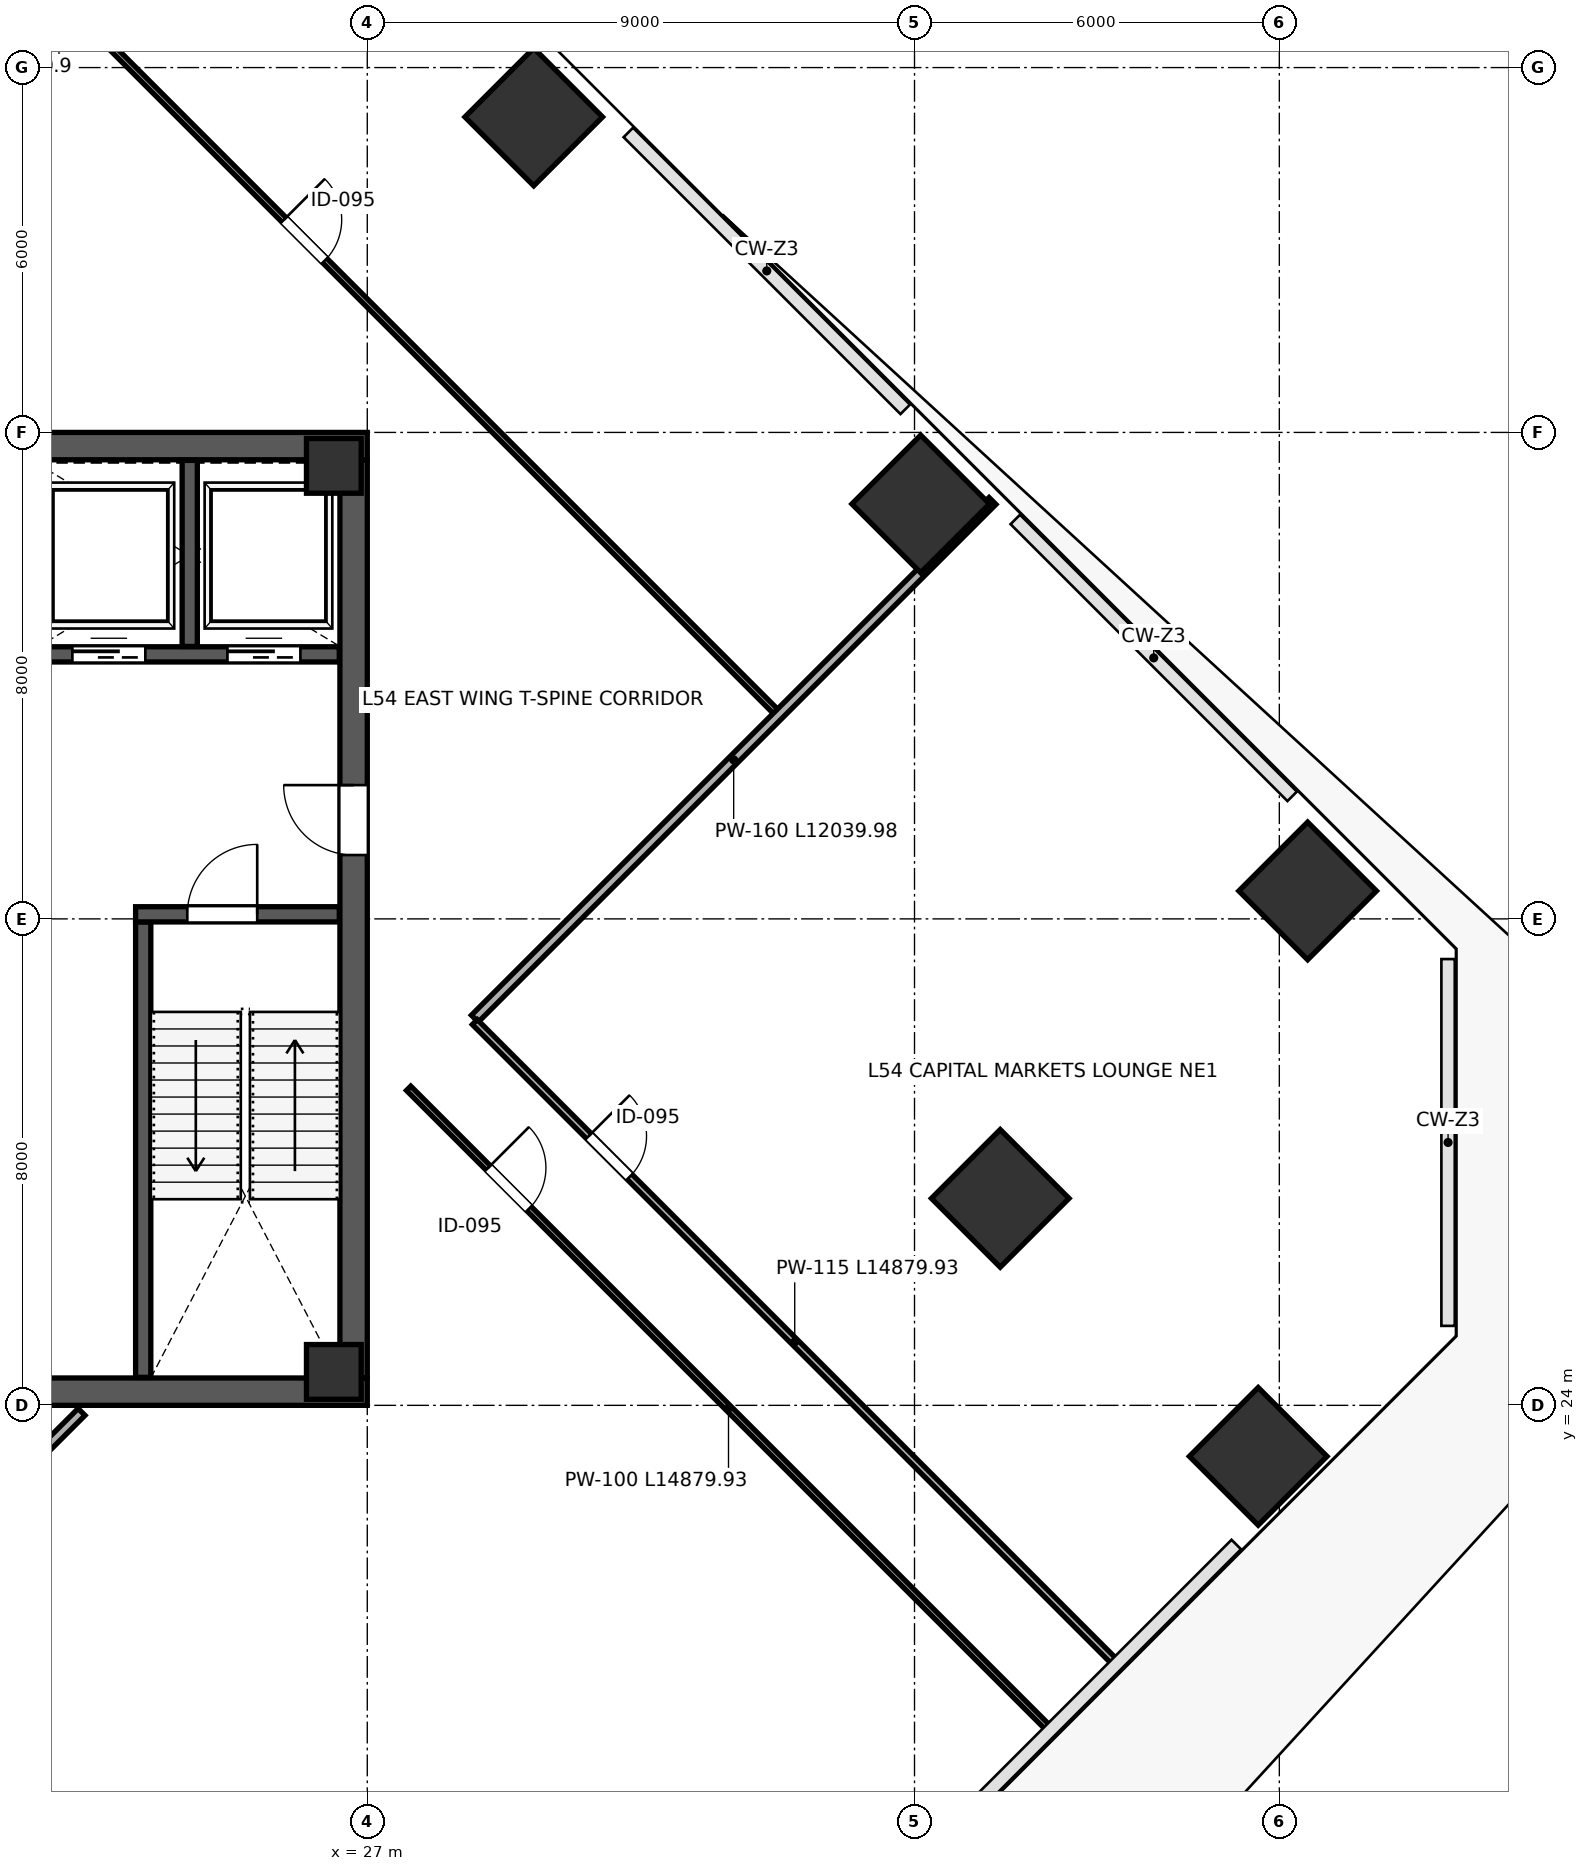
"""IFC4 building model, lengths in metres.
Left out: names, types, materials, properties, quantities, classifications, styles, units other than length and angle.
Written with IfcOpenShell. Run it as: python <this file> out.ifc"""

import sys

from ifc_helpers import new_model, si_unit, direction, frame, frame_2d, origin, origin_2d, place, context, subcontext, project, spatial, rectangle, extrude, source, transform, mapped, element, fill, save


model = new_model("IFC4")
c1 = context("Model", 3, precision=1e-05, world=origin(), true_north=direction((0.0, 1.0)))
c2 = subcontext(c1, "Body", "Model", "MODEL_VIEW")
j1 = project(units=[si_unit("LENGTHUNIT", "METRE"), si_unit("PLANEANGLEUNIT", "RADIAN")], contexts=[c1])
p1 = place(None, origin())
s1 = spatial("IfcSite", under=j1, at=p1, CompositionType="ELEMENT")
p2 = place(p1, origin())
s2 = spatial("IfcBuilding", under=s1, at=p2, CompositionType="ELEMENT")
p3 = place(p2, frame((0.0, 0.0, 241.6)))
s3 = spatial("IfcBuildingStorey", under=s2, at=p3, CompositionType="ELEMENT", Elevation=241.6)
m1 = source(origin(), c2, "Body", "SweptSolid", [
    extrude(rectangle(XDim=0.9, YDim=0.9, at=origin_2d()), origin(), (0.0, 0.0, 1.0), 4.198),
])
for number, where, z_axis, x_axis in (
    (1, (26.45, 24.55, 0.001), (0.0, 0.0, 1.0), (1.0, 0.0, 0.0)),
    (2, (26.45, 39.45, 0.001), (0.0, 0.0, 1.0), (1.0, 0.0, 0.0)),
):
    element("IfcColumn", number, at=place(p3, frame(where, z_axis=z_axis, x_axis=x_axis)), inside=s3, PredefinedType="COLUMN", context=c2, shape_type="MappedRepresentation", body=[
        mapped(m1, transform((0.0, 0.0, 0.0), scale=1.0)),
    ])
m2 = source(origin(), c2, "Body", "SweptSolid", [
    extrude(rectangle(XDim=1.6, YDim=1.6, at=origin_2d()), origin(), (0.0, 0.0, 1.0), 4.198),
])
for number, where, z_axis, x_axis in (
    (3, (29.738, 45.188, 0.001), (0.0, 0.0, 1.0), (-0.707, 0.707, 0.0)),
    (4, (36.102, 38.823, 0.001), (0.0, 0.0, 1.0), (-0.707, 0.707, 0.0)),
):
    element("IfcColumn", number, at=place(p3, frame(where, z_axis=z_axis, x_axis=x_axis)), inside=s3, PredefinedType="COLUMN", context=c2, shape_type="MappedRepresentation", body=[
        mapped(m2, transform((0.0, 0.0, 0.0), scale=1.0)),
    ])
m3 = source(origin(), c2, "Body", "SweptSolid", [
    extrude(rectangle(XDim=1.6, YDim=1.6, at=origin_2d()), origin(), (0.0, 0.0, 1.0), 4.198),
])
p4 = place(p3, frame((37.41, 27.404, 0.001), z_axis=(0.0, 0.0, 1.0), x_axis=(-0.707106781187, 0.707106781187, 0.0)))
e5 = element("IfcColumn", 5, at=p4, inside=s3, PredefinedType="COLUMN", context=c2, shape_type="MappedRepresentation", body=[
    mapped(m3, transform((0.0, 0.0, 0.0), scale=1.0)),
])
for number, where, z_axis, x_axis in (
    (6, (42.466, 32.46, 0.001), (0.0, 0.0, 1.0), (-0.707, 0.707, 0.0)),
    (7, (41.653, 23.161, 0.001), (0.0, 0.0, 1.0), (-0.707, 0.707, 0.0)),
):
    element("IfcColumn", number, at=place(p3, frame(where, z_axis=z_axis, x_axis=x_axis)), inside=s3, PredefinedType="COLUMN", context=c2, shape_type="MappedRepresentation", body=[
        mapped(m2, transform((0.0, 0.0, 0.0), scale=1.0)),
    ])
p5 = place(p3, frame((26.775, 24.45, 0.0), z_axis=(0.0, 0.0, 1.0), x_axis=(0.0, 1.0, 0.0)))
e8 = element("IfcWall", 8, at=p5, inside=s3, PredefinedType="SHEAR", context=c2, shape_type="SweptSolid", body=[
    extrude(rectangle(XDim=15.1, YDim=0.45, at=frame_2d((7.55, 0.0))), origin(), (0.0, 0.0, 1.0), 3.96),
])
p6 = place(p5, frame((8.6, 0.0, 0.0)))
e9 = element("IfcOpeningElement", 9, at=p6, cuts=e8, PredefinedType="OPENING", context=c2, shape_type="SweptSolid", body=[
    extrude(rectangle(XDim=1.15, YDim=2.2, at=frame_2d((0.575, 1.1))), frame((0.0, 0.235, 0.0), z_axis=(0.0, -1.0, 0.0), x_axis=(1.0, 0.0, 0.0)), (0.0, 0.0, 1.0), 0.47),
])
for number, where, z_axis, x_axis in (
    (10, (9.0, 24.225, 0.0), (0.0, 0.0, 1.0), (1.0, 0.0, 0.0)),
    (11, (9.0, 39.775, 0.0), (0.0, 0.0, 1.0), (1.0, 0.0, 0.0)),
):
    element("IfcWall", number, at=place(p3, frame(where, z_axis=z_axis, x_axis=x_axis)), inside=s3, PredefinedType="SHEAR", context=c2, shape_type="SweptSolid", body=[
        extrude(rectangle(XDim=18.0, YDim=0.45, at=frame_2d((9.0, 0.0))), origin(), (0.0, 0.0, 1.0), 3.96),
    ])
p7 = place(p3, frame((23.315, 24.46, 0.0), z_axis=(0.0, 0.0, 1.0), x_axis=(0.0, 1.0, 0.0)))
e12 = element("IfcWall", 12, at=p7, inside=s3, PredefinedType="SHEAR", context=c2, shape_type="SweptSolid", body=[
    extrude(rectangle(XDim=7.49, YDim=0.25, at=frame_2d((3.745, 0.0))), origin(), (0.0, 0.0, 1.0), 3.96),
])
p8 = place(p3, frame((23.19, 32.075, 0.0), z_axis=(0.0, 0.0, 1.0), x_axis=(1.0, 0.0, 0.0)))
e13 = element("IfcWall", 13, at=p8, inside=s3, PredefinedType="SHEAR", context=c2, shape_type="SweptSolid", body=[
    extrude(rectangle(XDim=3.35, YDim=0.25, at=frame_2d((1.675, 0.0))), origin(), (0.0, 0.0, 1.0), 3.96),
])
p9 = place(p8, frame((0.85, 0.0, 0.0)))
e14 = element("IfcOpeningElement", 14, at=p9, cuts=e13, PredefinedType="OPENING", context=c2, shape_type="SweptSolid", body=[
    extrude(rectangle(XDim=1.15, YDim=2.2, at=frame_2d((0.575, 1.1))), frame((0.0, 0.135, 0.0), z_axis=(0.0, -1.0, 0.0), x_axis=(1.0, 0.0, 0.0)), (0.0, 0.0, 1.0), 0.27),
])
p10 = place(p3, frame((21.45, 36.35, 0.0), z_axis=(0.0, 0.0, 1.0), x_axis=(1.0, 0.0, 0.0)))
e15 = element("IfcWall", 15, at=p10, inside=s3, PredefinedType="SHEAR", context=c2, shape_type="SweptSolid", body=[
    extrude(rectangle(XDim=5.09, YDim=0.25, at=frame_2d((2.545, 0.0))), origin(), (0.0, 0.0, 1.0), 3.96),
])
p11 = place(p10, frame((0.7, 0.0, 0.0)))
e16 = element("IfcOpeningElement", 16, at=p11, cuts=e15, PredefinedType="OPENING", context=c2, shape_type="SweptSolid", body=[
    extrude(rectangle(XDim=1.2, YDim=2.2, at=frame_2d((0.6, 1.1))), frame((0.0, 0.135, 0.0), z_axis=(0.0, -1.0, 0.0), x_axis=(1.0, 0.0, 0.0)), (0.0, 0.0, 1.0), 0.27),
])
p12 = place(p10, frame((3.25, 0.0, 0.0)))
e17 = element("IfcOpeningElement", 17, at=p12, cuts=e15, PredefinedType="OPENING", context=c2, shape_type="SweptSolid", body=[
    extrude(rectangle(XDim=1.2, YDim=2.2, at=frame_2d((0.6, 1.1))), frame((0.0, 0.135, 0.0), z_axis=(0.0, -1.0, 0.0), x_axis=(1.0, 0.0, 0.0)), (0.0, 0.0, 1.0), 0.27),
])
p13 = place(p3, frame((24.08, 36.48, 0.0), z_axis=(0.0, 0.0, 1.0), x_axis=(0.0, 1.0, 0.0)))
e18 = element("IfcWall", 18, at=p13, inside=s3, PredefinedType="SHEAR", context=c2, shape_type="SweptSolid", body=[
    extrude(rectangle(XDim=3.06, YDim=0.25, at=frame_2d((1.53, 0.0))), origin(), (0.0, 0.0, 1.0), 3.96),
])
p14 = place(p3, frame((17.993, 51.134, 0.0), z_axis=(0.0, 0.0, 1.0), x_axis=(0.707106781187, -0.707106781187, 0.0)))
e19 = element("IfcWall", 19, at=p14, inside=s3, PredefinedType="PARTITIONING", context=c2, shape_type="SweptSolid", body=[
    extrude(rectangle(XDim=22.27, YDim=0.1, at=frame_2d((11.135, 0.0))), origin(), (0.0, 0.0, 1.0), 3.96),
])
p15 = place(p14, frame((10.8, 0.0, 0.0)))
e20 = element("IfcOpeningElement", 20, at=p15, cuts=e19, PredefinedType="OPENING", context=c2, shape_type="SweptSolid", body=[
    extrude(rectangle(XDim=0.95, YDim=2.15, at=frame_2d((0.475, 1.075))), frame((0.0, 0.06, 0.0), z_axis=(0.0, -1.0, 0.0), x_axis=(1.0, 0.0, 0.0)), (0.0, 0.0, 1.0), 0.12),
])
p16 = place(p3, frame((28.769, 30.36, 0.0), z_axis=(0.0, 0.0, 1.0), x_axis=(0.707116919863, 0.707096642365, 0.0)))
e21 = element("IfcWall", 21, at=p16, inside=s3, PredefinedType="PARTITIONING", context=c2, shape_type="SweptSolid", body=[
    extrude(rectangle(XDim=12.04, YDim=0.16, at=frame_2d((6.02, 0.0))), origin(), (0.0, 0.0, 1.0), 3.195),
])
p17 = place(p3, frame((13.213, 14.803, 0.0), z_axis=(0.0, 0.0, 1.0), x_axis=(0.707116278481, 0.707097283765, 0.0)))
e22 = element("IfcWall", 22, at=p17, inside=s3, PredefinedType="PARTITIONING", context=c2, shape_type="SweptSolid", body=[
    extrude(rectangle(XDim=12.853, YDim=0.16, at=frame_2d((6.427, 0.0))), origin(), (0.0, 0.0, 1.0), 3.96),
])
p18 = place(p3, frame((28.769, 30.303, 0.0), z_axis=(0.0, 0.0, 1.0), x_axis=(0.707106781187, -0.707106781187, 0.0)))
e23 = element("IfcWall", 23, at=p18, inside=s3, PredefinedType="PARTITIONING", context=c2, shape_type="SweptSolid", body=[
    extrude(rectangle(XDim=14.88, YDim=0.115, at=frame_2d((7.44, 0.0))), origin(), (0.0, 0.0, 1.0), 3.96),
])
p19 = place(p18, frame((2.65, 0.0, 0.0)))
e24 = element("IfcOpeningElement", 24, at=p19, cuts=e23, PredefinedType="OPENING", context=c2, shape_type="SweptSolid", body=[
    extrude(rectangle(XDim=0.95, YDim=2.15, at=frame_2d((0.475, 1.075))), frame((0.0, 0.067, 0.0), z_axis=(0.0, -1.0, 0.0), x_axis=(1.0, 0.0, 0.0)), (0.0, 0.0, 1.0), 0.135),
])
p20 = place(p3, frame((27.68, 29.214, 0.0), z_axis=(0.0, 0.0, 1.0), x_axis=(0.707106781187, -0.707106781187, 0.0)))
e25 = element("IfcWall", 25, at=p20, inside=s3, PredefinedType="PARTITIONING", context=c2, shape_type="SweptSolid", body=[
    extrude(rectangle(XDim=14.88, YDim=0.1, at=frame_2d((7.44, 0.0))), origin(), (0.0, 0.0, 1.0), 3.96),
])
p21 = place(p20, frame((1.85, 0.0, 0.0)))
e26 = element("IfcOpeningElement", 26, at=p21, cuts=e25, PredefinedType="OPENING", context=c2, shape_type="SweptSolid", body=[
    extrude(rectangle(XDim=0.95, YDim=2.15, at=frame_2d((0.475, 1.075))), frame((0.0, 0.06, 0.0), z_axis=(0.0, -1.0, 0.0), x_axis=(1.0, 0.0, 0.0)), (0.0, 0.0, 1.0), 0.12),
])
m4 = source(origin(), c2, "Body", "SweptSolid", [
    extrude(rectangle(XDim=1.15, YDim=2.2, at=frame_2d((0.575, 1.1))), frame((0.0, 0.025, 0.0), z_axis=(0.0, -1.0, 0.0), x_axis=(1.0, 0.0, 0.0)), (0.0, 0.0, 1.0), 0.05),
])
p22 = place(p9, origin())
e27 = element("IfcDoor", 27, at=p22, inside=s3, OperationType="SINGLE_SWING_RIGHT", PredefinedType="DOOR", context=c2, shape_type="MappedRepresentation", body=[
    mapped(m4, transform((0.0, 0.0, 0.0), scale=1.0)),
])
fill(e14, e27)
m5 = source(origin(), c2, "Body", "SweptSolid", [
    extrude(rectangle(XDim=1.15, YDim=2.2, at=frame_2d((0.575, 1.1))), frame((0.0, 0.025, 0.0), z_axis=(0.0, -1.0, 0.0), x_axis=(1.0, 0.0, 0.0)), (0.0, 0.0, 1.0), 0.05),
])
p23 = place(p6, origin())
e28 = element("IfcDoor", 28, at=p23, inside=s3, OperationType="SINGLE_SWING_RIGHT", PredefinedType="DOOR", context=c2, shape_type="MappedRepresentation", body=[
    mapped(m5, transform((0.0, 0.0, 0.0), scale=1.0)),
])
fill(e9, e28)
m6 = source(origin(), c2, "Body", "SweptSolid", [
    extrude(rectangle(XDim=1.2, YDim=2.2, at=frame_2d((0.6, 1.1))), frame((0.0, 0.025, 0.0), z_axis=(0.0, -1.0, 0.0), x_axis=(1.0, 0.0, 0.0)), (0.0, 0.0, 1.0), 0.05),
])
p24 = place(p11, origin())
e29 = element("IfcDoor", 29, at=p24, inside=s3, OperationType="SLIDING_TO_LEFT", PredefinedType="DOOR", context=c2, shape_type="MappedRepresentation", body=[
    mapped(m6, transform((0.0, 0.0, 0.0), scale=1.0)),
])
fill(e16, e29)
p25 = place(p12, origin())
e30 = element("IfcDoor", 30, at=p25, inside=s3, OperationType="SLIDING_TO_RIGHT", PredefinedType="DOOR", context=c2, shape_type="MappedRepresentation", body=[
    mapped(m6, transform((0.0, 0.0, 0.0), scale=1.0)),
])
fill(e17, e30)
m7 = source(origin(), c2, "Body", "SweptSolid", [
    extrude(rectangle(XDim=0.95, YDim=2.15, at=frame_2d((0.475, 1.075))), frame((0.0, 0.025, 0.0), z_axis=(0.0, -1.0, 0.0), x_axis=(1.0, 0.0, 0.0)), (0.0, 0.0, 1.0), 0.05),
])
p26 = place(p15, origin())
e31 = element("IfcDoor", 31, at=p26, inside=s3, OperationType="SINGLE_SWING_LEFT", PredefinedType="DOOR", context=c2, shape_type="MappedRepresentation", body=[
    mapped(m7, transform((0.0, 0.0, 0.0), scale=1.0)),
])
fill(e20, e31)
p27 = place(p19, origin())
e32 = element("IfcDoor", 32, at=p27, inside=s3, OperationType="SINGLE_SWING_LEFT", PredefinedType="DOOR", context=c2, shape_type="MappedRepresentation", body=[
    mapped(m7, transform((0.0, 0.0, 0.0), scale=1.0)),
])
fill(e24, e32)
p28 = place(p21, origin())
e33 = element("IfcDoor", 33, at=p28, inside=s3, OperationType="SINGLE_SWING_LEFT", PredefinedType="DOOR", context=c2, shape_type="MappedRepresentation", body=[
    mapped(m7, transform((0.0, 0.0, 0.0), scale=1.0)),
])
fill(e26, e33)
save(model, sys.argv[1])
